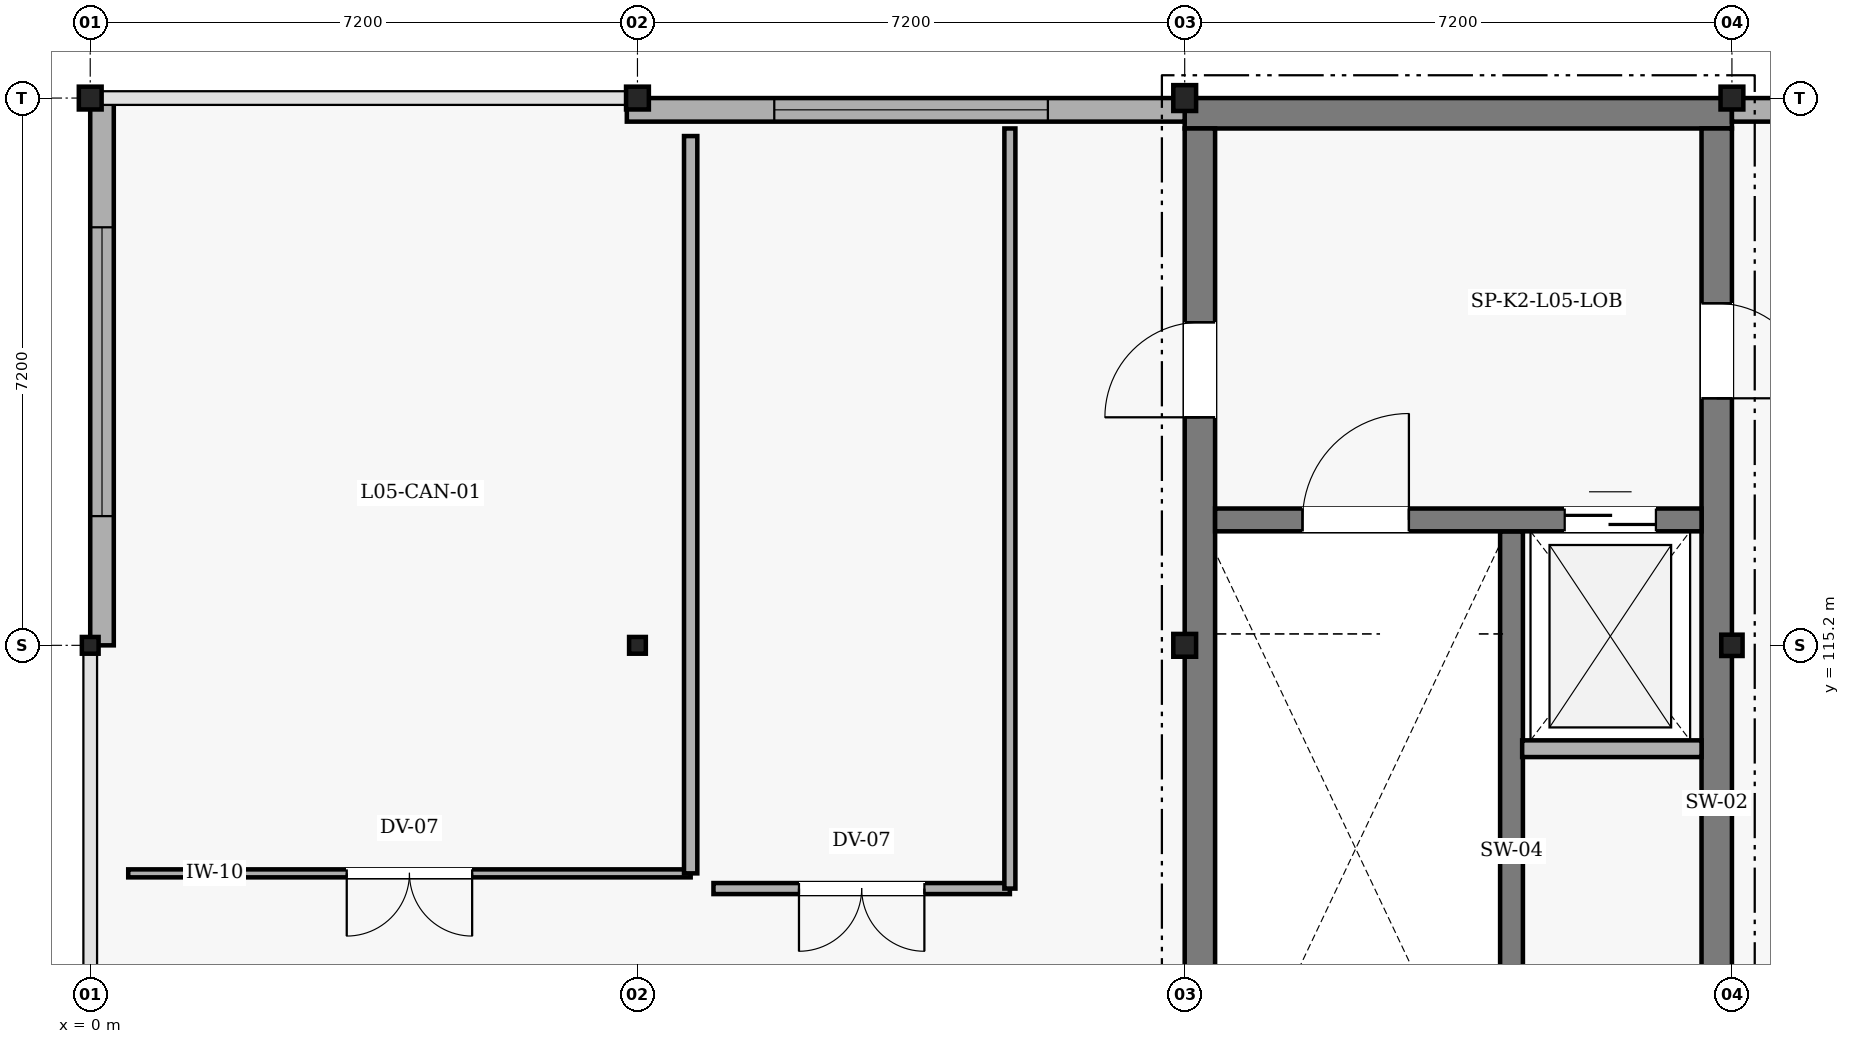
"""IFC4 building model, lengths in metres.
Left out: names, types, materials, properties, quantities, classifications, styles, units other than length and angle.
Written with IfcOpenShell. Run it as: python <this file> out.ifc"""

import sys

from ifc_helpers import new_model, si_unit, direction, frame, frame_2d, origin, origin_2d, place, context, subcontext, project, spatial, rectangle, i_section, extrude, element, fill, save


model = new_model("IFC4")
c1 = context("Model", 3, precision=1e-05, world=origin(), true_north=direction((0.0, 1.0)))
c2 = subcontext(c1, "Body", "Model", "MODEL_VIEW")
j1 = project(units=[si_unit("LENGTHUNIT", "METRE"), si_unit("PLANEANGLEUNIT", "RADIAN")], contexts=[c1])
p1 = place(None, origin())
s1 = spatial("IfcSite", under=j1, at=p1, CompositionType="ELEMENT")
p2 = place(p1, origin())
s2 = spatial("IfcBuilding", under=s1, at=p2, CompositionType="ELEMENT")
p3 = place(p2, frame((0.0, 0.0, 21.6)))
s3 = spatial("IfcBuildingStorey", under=s2, at=p3, CompositionType="ELEMENT", Elevation=21.6)
p4 = place(p3, frame((14.4, 122.2, 0.0), z_axis=(0.0, 0.0, 1.0), x_axis=(1.0, 0.0, 0.0)))
e1 = element("IfcWall", 1, at=p4, inside=s3, PredefinedType="SHEAR", context=c2, shape_type="SweptSolid", body=[
    extrude(rectangle(XDim=7.2, YDim=0.4, at=frame_2d((3.6, 0.0))), origin(), (0.0, 0.0, 1.0), 3.62),
])
p5 = place(p3, frame((21.4, 122.0, 0.0), z_axis=(0.0, 0.0, 1.0), x_axis=(0.0, -1.0, 0.0)))
e2 = element("IfcWall", 2, at=p5, inside=s3, PredefinedType="SHEAR", context=c2, shape_type="SweptSolid", body=[
    extrude(rectangle(XDim=13.6, YDim=0.4, at=frame_2d((6.8, 0.0))), origin(), (0.0, 0.0, 1.0), 3.62),
])
p6 = place(p5, frame((2.3, 0.0, 0.0)))
e3 = element("IfcOpeningElement", 3, at=p6, cuts=e2, PredefinedType="OPENING", context=c2, shape_type="SweptSolid", body=[
    extrude(rectangle(XDim=1.25, YDim=2.2, at=frame_2d((0.625, 1.1))), frame((0.0, 0.21, 0.0), z_axis=(0.0, -1.0, 0.0), x_axis=(1.0, 0.0, 0.0)), (0.0, 0.0, 1.0), 0.42),
])
p7 = place(p3, frame((14.6, 108.4, 0.0), z_axis=(0.0, 0.0, 1.0), x_axis=(0.0, 1.0, 0.0)))
e4 = element("IfcWall", 4, at=p7, inside=s3, PredefinedType="SHEAR", context=c2, shape_type="SweptSolid", body=[
    extrude(rectangle(XDim=13.6, YDim=0.4, at=frame_2d((6.8, 0.0))), origin(), (0.0, 0.0, 1.0), 3.62),
])
p8 = place(p7, frame((9.8, 0.0, 0.0)))
e5 = element("IfcOpeningElement", 5, at=p8, cuts=e4, PredefinedType="OPENING", context=c2, shape_type="SweptSolid", body=[
    extrude(rectangle(XDim=1.25, YDim=2.2, at=frame_2d((0.625, 1.1))), frame((0.0, 0.21, 0.0), z_axis=(0.0, -1.0, 0.0), x_axis=(1.0, 0.0, 0.0)), (0.0, 0.0, 1.0), 0.42),
])
p9 = place(p3, frame((18.7, 116.7, 0.0), z_axis=(0.0, 0.0, 1.0), x_axis=(0.0, -1.0, 0.0)))
e6 = element("IfcWall", 6, at=p9, inside=s3, PredefinedType="SHEAR", context=c2, shape_type="SweptSolid", body=[
    extrude(rectangle(XDim=8.3, YDim=0.3, at=frame_2d((4.15, 0.0))), origin(), (0.0, 0.0, 1.0), 3.62),
])
p10 = place(p3, frame((14.8, 116.85, 0.0), z_axis=(0.0, 0.0, 1.0), x_axis=(1.0, 0.0, 0.0)))
e7 = element("IfcWall", 7, at=p10, inside=s3, PredefinedType="SHEAR", context=c2, shape_type="SweptSolid", body=[
    extrude(rectangle(XDim=6.4, YDim=0.3, at=frame_2d((3.2, 0.0))), origin(), (0.0, 0.0, 1.0), 3.62),
])
p11 = place(p10, frame((1.15, 0.0, 0.0)))
e8 = element("IfcOpeningElement", 8, at=p11, cuts=e7, PredefinedType="OPENING", context=c2, shape_type="SweptSolid", body=[
    extrude(rectangle(XDim=1.4, YDim=2.2, at=frame_2d((0.7, 1.1))), frame((0.0, 0.16, 0.0), z_axis=(0.0, -1.0, 0.0), x_axis=(1.0, 0.0, 0.0)), (0.0, 0.0, 1.0), 0.32),
])
p12 = place(p10, frame((4.6, 0.0, 0.0)))
e9 = element("IfcOpeningElement", 9, at=p12, cuts=e7, PredefinedType="OPENING", context=c2, shape_type="SweptSolid", body=[
    extrude(rectangle(XDim=1.2, YDim=2.15, at=frame_2d((0.6, 1.075))), frame((0.0, 0.16, 0.0), z_axis=(0.0, -1.0, 0.0), x_axis=(1.0, 0.0, 0.0)), (0.0, 0.0, 1.0), 0.32),
])
p13 = place(p3, frame((0.0, 115.2, 0.0), z_axis=(0.0, 0.0, 1.0), x_axis=(1.0, 0.0, 0.0)))
e10 = element("IfcColumn", 10, at=p13, inside=s3, PredefinedType="COLUMN", context=c2, shape_type="SweptSolid", body=[
    extrude(i_section(OverallWidth=0.22, OverallDepth=0.22, WebThickness=0.01, FlangeThickness=0.016, FilletRadius=0.018, at=origin_2d()), origin(), (0.0, 0.0, 1.0), 3.62),
])
p14 = place(p3, frame((0.0, 122.4, 0.0), z_axis=(0.0, 0.0, 1.0), x_axis=(1.0, 0.0, 0.0)))
e11 = element("IfcColumn", 11, at=p14, inside=s3, PredefinedType="COLUMN", context=c2, shape_type="SweptSolid", body=[
    extrude(i_section(OverallWidth=0.3, OverallDepth=0.3, WebThickness=0.011, FlangeThickness=0.019, FilletRadius=0.027, at=origin_2d()), origin(), (0.0, 0.0, 1.0), 3.62),
])
p15 = place(p3, frame((7.2, 115.2, 0.0), z_axis=(0.0, 0.0, 1.0), x_axis=(1.0, 0.0, 0.0)))
e12 = element("IfcColumn", 12, at=p15, inside=s3, PredefinedType="COLUMN", context=c2, shape_type="SweptSolid", body=[
    extrude(i_section(OverallWidth=0.22, OverallDepth=0.22, WebThickness=0.01, FlangeThickness=0.016, FilletRadius=0.018, at=origin_2d()), origin(), (0.0, 0.0, 1.0), 3.62),
])
for number, where, z_axis, x_axis in (
    (13, (7.2, 122.4, 0.0), (0.0, 0.0, 1.0), (1.0, 0.0, 0.0)),
    (14, (14.4, 115.2, 0.0), (0.0, 0.0, 1.0), (1.0, 0.0, 0.0)),
):
    element("IfcColumn", number, at=place(p3, frame(where, z_axis=z_axis, x_axis=x_axis)), inside=s3, PredefinedType="COLUMN", context=c2, shape_type="SweptSolid", body=[
        extrude(i_section(OverallWidth=0.3, OverallDepth=0.3, WebThickness=0.011, FlangeThickness=0.019, FilletRadius=0.027, at=origin_2d()), origin(), (0.0, 0.0, 1.0), 3.62),
    ])
p16 = place(p3, frame((14.4, 122.4, 0.0), z_axis=(0.0, 0.0, 1.0), x_axis=(1.0, 0.0, 0.0)))
e15 = element("IfcColumn", 15, at=p16, inside=s3, PredefinedType="COLUMN", context=c2, shape_type="SweptSolid", body=[
    extrude(i_section(OverallWidth=0.3, OverallDepth=0.34, WebThickness=0.012, FlangeThickness=0.021, FilletRadius=0.027, at=origin_2d()), origin(), (0.0, 0.0, 1.0), 3.62),
])
p17 = place(p3, frame((21.6, 115.2, 0.0), z_axis=(0.0, 0.0, 1.0), x_axis=(1.0, 0.0, 0.0)))
e16 = element("IfcColumn", 16, at=p17, inside=s3, PredefinedType="COLUMN", context=c2, shape_type="SweptSolid", body=[
    extrude(i_section(OverallWidth=0.28, OverallDepth=0.28, WebThickness=0.01, FlangeThickness=0.018, FilletRadius=0.024, at=origin_2d()), origin(), (0.0, 0.0, 1.0), 3.62),
])
p18 = place(p3, frame((21.6, 122.4, 0.0), z_axis=(0.0, 0.0, 1.0), x_axis=(1.0, 0.0, 0.0)))
e17 = element("IfcColumn", 17, at=p18, inside=s3, PredefinedType="COLUMN", context=c2, shape_type="SweptSolid", body=[
    extrude(i_section(OverallWidth=0.3, OverallDepth=0.3, WebThickness=0.011, FlangeThickness=0.019, FilletRadius=0.027, at=origin_2d()), origin(), (0.0, 0.0, 1.0), 3.62),
])
p19 = place(p3, frame((0.155, 115.2, 0.0), z_axis=(0.0, 0.0, 1.0), x_axis=(0.0, 1.0, 0.0)))
e18 = element("IfcWall", 18, at=p19, inside=s3, PredefinedType="SOLIDWALL", context=c2, shape_type="SweptSolid", body=[
    extrude(rectangle(XDim=7.2, YDim=0.31, at=frame_2d((3.6, 0.0))), origin(), (0.0, 0.0, 1.0), 3.32),
])
p20 = place(p19, frame((1.7, 0.0, 0.9)))
e19 = element("IfcOpeningElement", 19, at=p20, cuts=e18, PredefinedType="OPENING", context=c2, shape_type="SweptSolid", body=[
    extrude(rectangle(XDim=3.8, YDim=1.85, at=frame_2d((1.9, 0.925))), frame((0.0, 0.165, 0.0), z_axis=(0.0, -1.0, 0.0), x_axis=(1.0, 0.0, 0.0)), (0.0, 0.0, 1.0), 0.33),
])
p21 = place(p3, frame((7.06, 122.245, 0.0), z_axis=(0.0, 0.0, 1.0), x_axis=(1.0, 0.0, 0.0)))
e20 = element("IfcWall", 20, at=p21, inside=s3, PredefinedType="SOLIDWALL", context=c2, shape_type="SweptSolid", body=[
    extrude(rectangle(XDim=7.34, YDim=0.31, at=frame_2d((3.67, 0.0))), origin(), (0.0, 0.0, 1.0), 3.32),
])
p22 = place(p21, frame((1.94, 0.0, 0.9)))
e21 = element("IfcOpeningElement", 21, at=p22, cuts=e20, PredefinedType="OPENING", context=c2, shape_type="SweptSolid", body=[
    extrude(rectangle(XDim=3.6, YDim=1.8, at=frame_2d((1.8, 0.9))), frame((0.0, 0.165, 0.0), z_axis=(0.0, -1.0, 0.0), x_axis=(1.0, 0.0, 0.0)), (0.0, 0.0, 1.0), 0.33),
])
p23 = place(p3, frame((21.6, 122.245, 0.0), z_axis=(0.0, 0.0, 1.0), x_axis=(1.0, 0.0, 0.0)))
e22 = element("IfcWall", 22, at=p23, inside=s3, PredefinedType="SOLIDWALL", context=c2, shape_type="SweptSolid", body=[
    extrude(rectangle(XDim=7.2, YDim=0.31, at=frame_2d((3.6, 0.0))), origin(), (0.0, 0.0, 1.0), 3.32),
])
p24 = place(p23, frame((2.0, 0.0, 0.9)))
e23 = element("IfcOpeningElement", 23, at=p24, cuts=e22, PredefinedType="OPENING", context=c2, shape_type="SweptSolid", body=[
    extrude(rectangle(XDim=3.2, YDim=1.6, at=frame_2d((1.6, 0.8))), frame((0.0, 0.165, 0.0), z_axis=(0.0, -1.0, 0.0), x_axis=(1.0, 0.0, 0.0)), (0.0, 0.0, 1.0), 0.33),
])
p25 = place(p3, frame((18.84, 113.84, 0.0), z_axis=(0.0, 0.0, 1.0), x_axis=(1.0, 0.0, 0.0)))
e24 = element("IfcWall", 24, at=p25, inside=s3, PredefinedType="PARTITIONING", context=c2, shape_type="SweptSolid", body=[
    extrude(rectangle(XDim=2.36, YDim=0.22, at=frame_2d((1.18, 0.0))), origin(), (0.0, 0.0, 1.0), 3.55),
])
p26 = place(p3, frame((7.9, 112.2, 0.0), z_axis=(0.0, 0.0, 1.0), x_axis=(-1.0, 0.0, 0.0)))
e25 = element("IfcWall", 25, at=p26, inside=s3, PredefinedType="PARTITIONING", context=c2, shape_type="SweptSolid", body=[
    extrude(rectangle(XDim=7.4, YDim=0.105, at=frame_2d((3.7, 0.0))), origin(), (0.0, 0.0, 1.0), 3.22),
])
p27 = place(p26, frame((2.875, 0.0, 0.0)))
e26 = element("IfcOpeningElement", 26, at=p27, cuts=e25, PredefinedType="OPENING", context=c2, shape_type="SweptSolid", body=[
    extrude(rectangle(XDim=1.65, YDim=2.25, at=frame_2d((0.825, 1.125))), frame((0.0, 0.062, 0.0), z_axis=(0.0, -1.0, 0.0), x_axis=(1.0, 0.0, 0.0)), (0.0, 0.0, 1.0), 0.125),
])
p28 = place(p3, frame((7.9, 121.9, 0.0), z_axis=(0.0, 0.0, 1.0), x_axis=(0.0, -1.0, 0.0)))
e27 = element("IfcWall", 27, at=p28, inside=s3, PredefinedType="PARTITIONING", context=c2, shape_type="SweptSolid", body=[
    extrude(rectangle(XDim=9.7, YDim=0.175, at=frame_2d((4.85, 0.0))), origin(), (0.0, 0.0, 1.0), 3.17),
])
p29 = place(p3, frame((12.1, 112.0, 0.0), z_axis=(0.0, 0.0, 1.0), x_axis=(-1.0, 0.0, 0.0)))
e28 = element("IfcWall", 28, at=p29, inside=s3, PredefinedType="PARTITIONING", context=c2, shape_type="SweptSolid", body=[
    extrude(rectangle(XDim=3.9, YDim=0.145, at=frame_2d((1.95, 0.0))), origin(), (0.0, 0.0, 1.0), 3.55),
])
p30 = place(p29, frame((1.125, 0.0, 0.0)))
e29 = element("IfcOpeningElement", 29, at=p30, cuts=e28, PredefinedType="OPENING", context=c2, shape_type="SweptSolid", body=[
    extrude(rectangle(XDim=1.65, YDim=2.25, at=frame_2d((0.825, 1.125))), frame((0.0, 0.083, 0.0), z_axis=(0.0, -1.0, 0.0), x_axis=(1.0, 0.0, 0.0)), (0.0, 0.0, 1.0), 0.165),
])
p31 = place(p3, frame((12.1, 122.0, 0.0), z_axis=(0.0, 0.0, 1.0), x_axis=(0.0, -1.0, 0.0)))
e30 = element("IfcWall", 30, at=p31, inside=s3, PredefinedType="PARTITIONING", context=c2, shape_type="SweptSolid", body=[
    extrude(rectangle(XDim=10.0, YDim=0.145, at=frame_2d((5.0, 0.0))), origin(), (0.0, 0.0, 1.0), 3.17),
])
p32 = place(p20, origin())
e31 = element("IfcWindow", 31, at=p32, inside=s3, PartitioningType="SINGLE_PANEL", PredefinedType="WINDOW", context=c2, shape_type="SweptSolid", body=[
    extrude(rectangle(XDim=3.8, YDim=1.85, at=frame_2d((1.9, 0.925))), frame((0.0, 0.03, 0.0), z_axis=(0.0, -1.0, 0.0), x_axis=(1.0, 0.0, 0.0)), (0.0, 0.0, 1.0), 0.06),
])
fill(e19, e31)
p33 = place(p22, origin())
e32 = element("IfcWindow", 32, at=p33, inside=s3, PartitioningType="SINGLE_PANEL", PredefinedType="WINDOW", context=c2, shape_type="SweptSolid", body=[
    extrude(rectangle(XDim=3.6, YDim=1.8, at=frame_2d((1.8, 0.9))), frame((0.0, 0.03, 0.0), z_axis=(0.0, -1.0, 0.0), x_axis=(1.0, 0.0, 0.0)), (0.0, 0.0, 1.0), 0.06),
])
fill(e21, e32)
p34 = place(p11, origin())
e33 = element("IfcDoor", 33, at=p34, inside=s3, OperationType="SINGLE_SWING_RIGHT", PredefinedType="DOOR", context=c2, shape_type="SweptSolid", body=[
    extrude(rectangle(XDim=1.4, YDim=2.2, at=frame_2d((0.7, 1.1))), frame((0.0, 0.025, 0.0), z_axis=(0.0, -1.0, 0.0), x_axis=(1.0, 0.0, 0.0)), (0.0, 0.0, 1.0), 0.05),
])
fill(e8, e33)
p35 = place(p12, origin())
e34 = element("IfcDoor", 34, at=p35, inside=s3, OperationType="DOUBLE_DOOR_SLIDING", PredefinedType="DOOR", context=c2, shape_type="SweptSolid", body=[
    extrude(rectangle(XDim=1.2, YDim=2.15, at=frame_2d((0.6, 1.075))), frame((0.0, 0.025, 0.0), z_axis=(0.0, -1.0, 0.0), x_axis=(1.0, 0.0, 0.0)), (0.0, 0.0, 1.0), 0.05),
])
fill(e9, e34)
p36 = place(p8, origin())
e35 = element("IfcDoor", 35, at=p36, inside=s3, OperationType="SINGLE_SWING_LEFT", PredefinedType="DOOR", context=c2, shape_type="SweptSolid", body=[
    extrude(rectangle(XDim=1.25, YDim=2.2, at=frame_2d((0.625, 1.1))), frame((0.0, 0.025, 0.0), z_axis=(0.0, -1.0, 0.0), x_axis=(1.0, 0.0, 0.0)), (0.0, 0.0, 1.0), 0.05),
])
fill(e5, e35)
p37 = place(p6, origin())
e36 = element("IfcDoor", 36, at=p37, inside=s3, OperationType="SINGLE_SWING_RIGHT", PredefinedType="DOOR", context=c2, shape_type="SweptSolid", body=[
    extrude(rectangle(XDim=1.25, YDim=2.2, at=frame_2d((0.625, 1.1))), frame((0.0, 0.025, 0.0), z_axis=(0.0, -1.0, 0.0), x_axis=(1.0, 0.0, 0.0)), (0.0, 0.0, 1.0), 0.05),
])
fill(e3, e36)
p38 = place(p27, origin())
e37 = element("IfcDoor", 37, at=p38, inside=s3, OperationType="DOUBLE_DOOR_SINGLE_SWING", PredefinedType="DOOR", context=c2, shape_type="SweptSolid", body=[
    extrude(rectangle(XDim=1.65, YDim=2.25, at=frame_2d((0.825, 1.125))), frame((0.0, 0.025, 0.0), z_axis=(0.0, -1.0, 0.0), x_axis=(1.0, 0.0, 0.0)), (0.0, 0.0, 1.0), 0.05),
])
fill(e26, e37)
p39 = place(p30, origin())
e38 = element("IfcDoor", 38, at=p39, inside=s3, OperationType="DOUBLE_DOOR_SINGLE_SWING", PredefinedType="DOOR", context=c2, shape_type="SweptSolid", body=[
    extrude(rectangle(XDim=1.65, YDim=2.25, at=frame_2d((0.825, 1.125))), frame((0.0, 0.025, 0.0), z_axis=(0.0, -1.0, 0.0), x_axis=(1.0, 0.0, 0.0)), (0.0, 0.0, 1.0), 0.05),
])
fill(e29, e38)
save(model, sys.argv[1])
